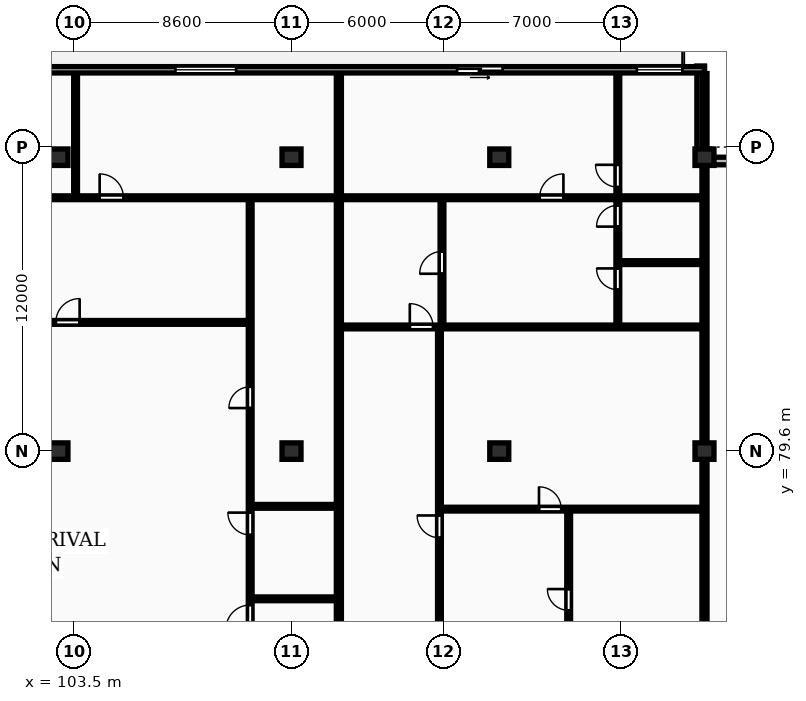
"""IFC4 building model, lengths in metres.
Left out: names, types, materials, properties, quantities, classifications, styles, units other than length and angle.
Written with IfcOpenShell. Run it as: python <this file> out.ifc"""

import sys

from ifc_helpers import new_model, si_unit, direction, frame, frame_2d, origin, origin_2d, place, context, subcontext, project, spatial, rectangle, extrude, element, fill, save


model = new_model("IFC4")
c1 = context("Model", 3, precision=1e-05, world=origin(), true_north=direction((0.0, 1.0)))
c2 = subcontext(c1, "Body", "Model", "MODEL_VIEW")
j1 = project(units=[si_unit("LENGTHUNIT", "METRE"), si_unit("PLANEANGLEUNIT", "RADIAN")], contexts=[c1])
p1 = place(None, origin())
s1 = spatial("IfcSite", under=j1, at=p1, CompositionType="ELEMENT")
p2 = place(p1, origin())
s2 = spatial("IfcBuilding", under=s1, at=p2, CompositionType="ELEMENT")
p3 = place(p2, frame((0.0, 0.0, 242.45)))
s3 = spatial("IfcBuildingStorey", under=s2, at=p3, CompositionType="ELEMENT", Elevation=242.45)
for number, where, z_axis, x_axis in (
    (1, (102.9, 79.6, 0.0), (0.0, 0.0, 1.0), (1.0, 0.0, 0.0)),
    (2, (102.9, 91.2, 0.0), (0.0, 0.0, 1.0), (1.0, 0.0, 0.0)),
    (3, (112.1, 79.6, 0.0), (0.0, 0.0, 1.0), (1.0, 0.0, 0.0)),
    (4, (112.1, 91.2, 0.0), (0.0, 0.0, 1.0), (1.0, 0.0, 0.0)),
    (5, (120.3, 79.6, 0.0), (0.0, 0.0, 1.0), (1.0, 0.0, 0.0)),
    (6, (120.3, 91.2, 0.0), (0.0, 0.0, 1.0), (1.0, 0.0, 0.0)),
    (7, (128.4, 79.6, 0.0), (0.0, 0.0, 1.0), (1.0, 0.0, 0.0)),
    (8, (128.4, 91.2, 0.0), (0.0, 0.0, 1.0), (1.0, 0.0, 0.0)),
):
    element("IfcColumn", number, at=place(p3, frame(where, z_axis=z_axis, x_axis=x_axis)), inside=s3, PredefinedType="COLUMN", context=c2, shape_type="SweptSolid", body=[
        extrude(rectangle(XDim=0.75, YDim=0.65, at=origin_2d()), origin(), (0.0, 0.0, 1.0), 3.45),
    ])
for number, where, z_axis, x_axis in (
    (9, (132.0, 91.05, 0.0), (0.0, 0.0, 1.0), (-1.0, 0.0, 0.0)),
    (10, (128.25, 91.2, 0.0), (0.0, 0.0, 1.0), (0.0, 1.0, 0.0)),
):
    element("IfcWall", number, at=place(p3, frame(where, z_axis=z_axis, x_axis=x_axis)), inside=s3, PredefinedType="STANDARD", context=c2, shape_type="SweptSolid", body=[
        extrude(rectangle(XDim=3.6, YDim=0.3, at=frame_2d((1.8, 0.0))), origin(), (0.0, 0.0, 1.0), 3.17),
    ])
p4 = place(p3, frame((128.4, 94.65, 0.0), z_axis=(0.0, 0.0, 1.0), x_axis=(-1.0, 0.0, 0.0)))
e11 = element("IfcWall", 11, at=p4, inside=s3, PredefinedType="STANDARD", context=c2, shape_type="SweptSolid", body=[
    extrude(rectangle(XDim=68.6, YDim=0.25, at=frame_2d((34.3, 0.0))), origin(), (0.0, 0.0, 1.0), 3.17),
])
p5 = place(p4, frame((59.137, 0.0, 0.85)))
e12 = element("IfcOpeningElement", 12, at=p5, cuts=e11, PredefinedType="OPENING", context=c2, shape_type="SweptSolid", body=[
    extrude(rectangle(XDim=2.4, YDim=1.9, at=frame_2d((1.2, 0.95))), frame((0.0, 0.135, 0.0), z_axis=(0.0, -1.0, 0.0), x_axis=(1.0, 0.0, 0.0)), (0.0, 0.0, 1.0), 0.27),
])
p6 = place(p4, frame((65.245, 0.0, 0.0)))
e13 = element("IfcOpeningElement", 13, at=p6, cuts=e11, PredefinedType="OPENING", context=c2, shape_type="SweptSolid", body=[
    extrude(rectangle(XDim=1.8, YDim=2.2, at=frame_2d((0.9, 1.1))), frame((0.0, 0.135, 0.0), z_axis=(0.0, -1.0, 0.0), x_axis=(1.0, 0.0, 0.0)), (0.0, 0.0, 1.0), 0.27),
])
p7 = place(p4, frame((53.56, 0.0, 0.85)))
e14 = element("IfcOpeningElement", 14, at=p7, cuts=e11, PredefinedType="OPENING", context=c2, shape_type="SweptSolid", body=[
    extrude(rectangle(XDim=2.4, YDim=1.9, at=frame_2d((1.2, 0.95))), frame((0.0, 0.135, 0.0), z_axis=(0.0, -1.0, 0.0), x_axis=(1.0, 0.0, 0.0)), (0.0, 0.0, 1.0), 0.27),
])
p8 = place(p4, frame((47.188, 0.0, 0.0)))
e15 = element("IfcOpeningElement", 15, at=p8, cuts=e11, PredefinedType="OPENING", context=c2, shape_type="SweptSolid", body=[
    extrude(rectangle(XDim=1.8, YDim=2.2, at=frame_2d((0.9, 1.1))), frame((0.0, 0.135, 0.0), z_axis=(0.0, -1.0, 0.0), x_axis=(1.0, 0.0, 0.0)), (0.0, 0.0, 1.0), 0.27),
])
p9 = place(p4, frame((36.928, 0.0, 0.85)))
e16 = element("IfcOpeningElement", 16, at=p9, cuts=e11, PredefinedType="OPENING", context=c2, shape_type="SweptSolid", body=[
    extrude(rectangle(XDim=2.4, YDim=1.9, at=frame_2d((1.2, 0.95))), frame((0.0, 0.135, 0.0), z_axis=(0.0, -1.0, 0.0), x_axis=(1.0, 0.0, 0.0)), (0.0, 0.0, 1.0), 0.27),
])
p10 = place(p4, frame((27.64, 0.0, 0.0)))
e17 = element("IfcOpeningElement", 17, at=p10, cuts=e11, PredefinedType="OPENING", context=c2, shape_type="SweptSolid", body=[
    extrude(rectangle(XDim=1.8, YDim=2.2, at=frame_2d((0.9, 1.1))), frame((0.0, 0.135, 0.0), z_axis=(0.0, -1.0, 0.0), x_axis=(1.0, 0.0, 0.0)), (0.0, 0.0, 1.0), 0.27),
])
p11 = place(p4, frame((18.487, 0.0, 0.85)))
e18 = element("IfcOpeningElement", 18, at=p11, cuts=e11, PredefinedType="OPENING", context=c2, shape_type="SweptSolid", body=[
    extrude(rectangle(XDim=2.4, YDim=1.9, at=frame_2d((1.2, 0.95))), frame((0.0, 0.135, 0.0), z_axis=(0.0, -1.0, 0.0), x_axis=(1.0, 0.0, 0.0)), (0.0, 0.0, 1.0), 0.27),
])
p12 = place(p4, frame((7.966, 0.0, 0.0)))
e19 = element("IfcOpeningElement", 19, at=p12, cuts=e11, PredefinedType="OPENING", context=c2, shape_type="SweptSolid", body=[
    extrude(rectangle(XDim=1.8, YDim=2.2, at=frame_2d((0.9, 1.1))), frame((0.0, 0.135, 0.0), z_axis=(0.0, -1.0, 0.0), x_axis=(1.0, 0.0, 0.0)), (0.0, 0.0, 1.0), 0.27),
])
p13 = place(p4, frame((0.87, 0.0, 0.85)))
e20 = element("IfcOpeningElement", 20, at=p13, cuts=e11, PredefinedType="OPENING", context=c2, shape_type="SweptSolid", body=[
    extrude(rectangle(XDim=1.8, YDim=1.8, at=frame_2d((0.9, 0.9))), frame((0.0, 0.135, 0.0), z_axis=(0.0, -1.0, 0.0), x_axis=(1.0, 0.0, 0.0)), (0.0, 0.0, 1.0), 0.27),
])
p14 = place(p3, frame((128.4, 70.18, 0.0), z_axis=(0.0, 0.0, 1.0), x_axis=(0.0, 1.0, 0.0)))
e21 = element("IfcWall", 21, at=p14, inside=s3, PredefinedType="PARTITIONING", context=c2, shape_type="SweptSolid", body=[
    extrude(rectangle(XDim=24.32, YDim=0.2, at=frame_2d((12.16, 0.0))), origin(), (0.0, 0.0, 1.0), 2.477),
])
p15 = place(p3, frame((113.969, 70.18, 0.0), z_axis=(0.0, 0.0, 1.0), x_axis=(0.0, 1.0, 0.0)))
e22 = element("IfcWall", 22, at=p15, inside=s3, PredefinedType="PARTITIONING", context=c2, shape_type="SweptSolid", body=[
    extrude(rectangle(XDim=24.32, YDim=0.2, at=frame_2d((12.16, 0.0))), origin(), (0.0, 0.0, 1.0), 3.17),
])
p16 = place(p3, frame((96.104, 84.68, 0.0), z_axis=(0.0, 0.0, 1.0), x_axis=(1.0, 0.0, 0.0)))
e23 = element("IfcWall", 23, at=p16, inside=s3, PredefinedType="PARTITIONING", context=c2, shape_type="SweptSolid", body=[
    extrude(rectangle(XDim=14.324, YDim=0.15, at=frame_2d((7.162, 0.0))), origin(), (0.0, 0.0, 1.0), 3.17),
])
p17 = place(p16, frame((6.692, 0.0, 0.0)))
e24 = element("IfcOpeningElement", 24, at=p17, cuts=e23, PredefinedType="OPENING", context=c2, shape_type="SweptSolid", body=[
    extrude(rectangle(XDim=0.94, YDim=2.1, at=frame_2d((0.47, 1.05))), frame((0.0, 0.085, 0.0), z_axis=(0.0, -1.0, 0.0), x_axis=(1.0, 0.0, 0.0)), (0.0, 0.0, 1.0), 0.17),
])
for number, where, z_axis, x_axis in (
    (25, (110.529, 73.77, 0.0), (0.0, 0.0, 1.0), (1.0, 0.0, 0.0)),
    (26, (110.529, 77.42, 0.0), (0.0, 0.0, 1.0), (1.0, 0.0, 0.0)),
):
    element("IfcWall", number, at=place(p3, frame(where, z_axis=z_axis, x_axis=x_axis)), inside=s3, PredefinedType="PARTITIONING", context=c2, shape_type="SweptSolid", body=[
        extrude(rectangle(XDim=3.36, YDim=0.15, at=frame_2d((1.68, 0.0))), origin(), (0.0, 0.0, 1.0), 3.17),
    ])
p18 = place(p3, frame((110.469, 70.16, 0.0), z_axis=(0.0, 0.0, 1.0), x_axis=(0.0, 1.0, 0.0)))
e27 = element("IfcWall", 27, at=p18, inside=s3, PredefinedType="PARTITIONING", context=c2, shape_type="SweptSolid", body=[
    extrude(rectangle(XDim=19.38, YDim=0.15, at=frame_2d((9.69, 0.0))), origin(), (0.0, 0.0, 1.0), 3.17),
])
p19 = place(p18, frame((2.406, 0.0, 0.0)))
e28 = element("IfcOpeningElement", 28, at=p19, cuts=e27, PredefinedType="OPENING", context=c2, shape_type="SweptSolid", body=[
    extrude(rectangle(XDim=0.96, YDim=2.1, at=frame_2d((0.48, 1.05))), frame((0.0, 0.085, 0.0), z_axis=(0.0, -1.0, 0.0), x_axis=(1.0, 0.0, 0.0)), (0.0, 0.0, 1.0), 0.17),
])
p20 = place(p18, frame((6.133, 0.0, 0.0)))
e29 = element("IfcOpeningElement", 29, at=p20, cuts=e27, PredefinedType="OPENING", context=c2, shape_type="SweptSolid", body=[
    extrude(rectangle(XDim=0.88, YDim=2.06, at=frame_2d((0.44, 1.03))), frame((0.0, 0.085, 0.0), z_axis=(0.0, -1.0, 0.0), x_axis=(1.0, 0.0, 0.0)), (0.0, 0.0, 1.0), 0.17),
])
p21 = place(p18, frame((11.139, 0.0, 0.0)))
e30 = element("IfcOpeningElement", 30, at=p21, cuts=e27, PredefinedType="OPENING", context=c2, shape_type="SweptSolid", body=[
    extrude(rectangle(XDim=0.84, YDim=2.04, at=frame_2d((0.42, 1.02))), frame((0.0, 0.085, 0.0), z_axis=(0.0, -1.0, 0.0), x_axis=(1.0, 0.0, 0.0)), (0.0, 0.0, 1.0), 0.17),
])
p22 = place(p3, frame((103.576, 89.68, 0.0), z_axis=(0.0, 0.0, 1.0), x_axis=(0.0, 1.0, 0.0)))
e31 = element("IfcWall", 31, at=p22, inside=s3, PredefinedType="PARTITIONING", context=c2, shape_type="SweptSolid", body=[
    extrude(rectangle(XDim=4.82, YDim=0.15, at=frame_2d((2.41, 0.0))), origin(), (0.0, 0.0, 1.0), 3.17),
])
p23 = place(p3, frame((96.104, 89.6, 0.0), z_axis=(0.0, 0.0, 1.0), x_axis=(1.0, 0.0, 0.0)))
e32 = element("IfcWall", 32, at=p23, inside=s3, PredefinedType="PARTITIONING", context=c2, shape_type="SweptSolid", body=[
    extrude(rectangle(XDim=17.785, YDim=0.15, at=frame_2d((8.892, 0.0))), origin(), (0.0, 0.0, 1.0), 3.17),
])
p24 = place(p23, frame((4.231, 0.0, 0.0)))
e33 = element("IfcOpeningElement", 33, at=p24, cuts=e32, PredefinedType="OPENING", context=c2, shape_type="SweptSolid", body=[
    extrude(rectangle(XDim=0.94, YDim=2.1, at=frame_2d((0.47, 1.05))), frame((0.0, 0.085, 0.0), z_axis=(0.0, -1.0, 0.0), x_axis=(1.0, 0.0, 0.0)), (0.0, 0.0, 1.0), 0.17),
])
p25 = place(p23, frame((8.422, 0.0, 0.0)))
e34 = element("IfcOpeningElement", 34, at=p25, cuts=e32, PredefinedType="OPENING", context=c2, shape_type="SweptSolid", body=[
    extrude(rectangle(XDim=0.94, YDim=2.1, at=frame_2d((0.47, 1.05))), frame((0.0, 0.085, 0.0), z_axis=(0.0, -1.0, 0.0), x_axis=(1.0, 0.0, 0.0)), (0.0, 0.0, 1.0), 0.17),
])
p26 = place(p3, frame((123.039, 70.16, 0.0), z_axis=(0.0, 0.0, 1.0), x_axis=(0.0, 1.0, 0.0)))
e35 = element("IfcWall", 35, at=p26, inside=s3, PredefinedType="PARTITIONING", context=c2, shape_type="SweptSolid", body=[
    extrude(rectangle(XDim=7.15, YDim=0.15, at=frame_2d((3.575, 0.0))), origin(), (0.0, 0.0, 1.0), 3.17),
])
p27 = place(p26, frame((3.155, 0.0, 0.0)))
e36 = element("IfcOpeningElement", 36, at=p27, cuts=e35, PredefinedType="OPENING", context=c2, shape_type="SweptSolid", body=[
    extrude(rectangle(XDim=0.84, YDim=2.04, at=frame_2d((0.42, 1.02))), frame((0.0, 0.085, 0.0), z_axis=(0.0, -1.0, 0.0), x_axis=(1.0, 0.0, 0.0)), (0.0, 0.0, 1.0), 0.17),
])
p28 = place(p3, frame((117.999, 77.31, 0.0), z_axis=(0.0, 0.0, 1.0), x_axis=(1.0, 0.0, 0.0)))
e37 = element("IfcWall", 37, at=p28, inside=s3, PredefinedType="PARTITIONING", context=c2, shape_type="SweptSolid", body=[
    extrude(rectangle(XDim=10.321, YDim=0.15, at=frame_2d((5.161, 0.0))), origin(), (0.0, 0.0, 1.0), 3.17),
])
p29 = place(p28, frame((3.869, 0.0, 0.0)))
e38 = element("IfcOpeningElement", 38, at=p29, cuts=e37, PredefinedType="OPENING", context=c2, shape_type="SweptSolid", body=[
    extrude(rectangle(XDim=0.88, YDim=2.06, at=frame_2d((0.44, 1.03))), frame((0.0, 0.085, 0.0), z_axis=(0.0, -1.0, 0.0), x_axis=(1.0, 0.0, 0.0)), (0.0, 0.0, 1.0), 0.17),
])
p30 = place(p3, frame((117.939, 70.16, 0.0), z_axis=(0.0, 0.0, 1.0), x_axis=(0.0, 1.0, 0.0)))
e39 = element("IfcWall", 39, at=p30, inside=s3, PredefinedType="PARTITIONING", context=c2, shape_type="SweptSolid", body=[
    extrude(rectangle(XDim=14.3, YDim=0.15, at=frame_2d((7.15, 0.0))), origin(), (0.0, 0.0, 1.0), 3.17),
])
p31 = place(p30, frame((6.02, 0.0, 0.0)))
e40 = element("IfcOpeningElement", 40, at=p31, cuts=e39, PredefinedType="OPENING", context=c2, shape_type="SweptSolid", body=[
    extrude(rectangle(XDim=0.88, YDim=2.06, at=frame_2d((0.44, 1.03))), frame((0.0, 0.085, 0.0), z_axis=(0.0, -1.0, 0.0), x_axis=(1.0, 0.0, 0.0)), (0.0, 0.0, 1.0), 0.17),
])
p32 = place(p3, frame((118.039, 84.54, 0.0), z_axis=(0.0, 0.0, 1.0), x_axis=(0.0, 1.0, 0.0)))
e41 = element("IfcWall", 41, at=p32, inside=s3, PredefinedType="PARTITIONING", context=c2, shape_type="SweptSolid", body=[
    extrude(rectangle(XDim=5.0, YDim=0.15, at=frame_2d((2.5, 0.0))), origin(), (0.0, 0.0, 1.0), 3.17),
])
p33 = place(p32, frame((2.06, 0.0, 0.0)))
e42 = element("IfcOpeningElement", 42, at=p33, cuts=e41, PredefinedType="OPENING", context=c2, shape_type="SweptSolid", body=[
    extrude(rectangle(XDim=0.88, YDim=2.06, at=frame_2d((0.44, 1.03))), frame((0.0, 0.085, 0.0), z_axis=(0.0, -1.0, 0.0), x_axis=(1.0, 0.0, 0.0)), (0.0, 0.0, 1.0), 0.17),
])
p34 = place(p3, frame((125.04, 87.04, 0.0), z_axis=(0.0, 0.0, 1.0), x_axis=(1.0, 0.0, 0.0)))
e43 = element("IfcWall", 43, at=p34, inside=s3, PredefinedType="PARTITIONING", context=c2, shape_type="SweptSolid", body=[
    extrude(rectangle(XDim=3.28, YDim=0.15, at=frame_2d((1.64, 0.0))), origin(), (0.0, 0.0, 1.0), 3.17),
])
p35 = place(p3, frame((124.98, 84.54, 0.0), z_axis=(0.0, 0.0, 1.0), x_axis=(0.0, 1.0, 0.0)))
e44 = element("IfcWall", 44, at=p35, inside=s3, PredefinedType="PARTITIONING", context=c2, shape_type="SweptSolid", body=[
    extrude(rectangle(XDim=9.96, YDim=0.15, at=frame_2d((4.98, 0.0))), origin(), (0.0, 0.0, 1.0), 3.17),
])
p36 = place(p35, frame((1.43, 0.0, 0.0)))
e45 = element("IfcOpeningElement", 45, at=p36, cuts=e44, PredefinedType="OPENING", context=c2, shape_type="SweptSolid", body=[
    extrude(rectangle(XDim=0.84, YDim=2.04, at=frame_2d((0.42, 1.02))), frame((0.0, 0.085, 0.0), z_axis=(0.0, -1.0, 0.0), x_axis=(1.0, 0.0, 0.0)), (0.0, 0.0, 1.0), 0.17),
])
p37 = place(p35, frame((3.92, 0.0, 0.0)))
e46 = element("IfcOpeningElement", 46, at=p37, cuts=e44, PredefinedType="OPENING", context=c2, shape_type="SweptSolid", body=[
    extrude(rectangle(XDim=0.84, YDim=2.04, at=frame_2d((0.42, 1.02))), frame((0.0, 0.085, 0.0), z_axis=(0.0, -1.0, 0.0), x_axis=(1.0, 0.0, 0.0)), (0.0, 0.0, 1.0), 0.17),
])
p38 = place(p35, frame((5.48, 0.0, 0.0)))
e47 = element("IfcOpeningElement", 47, at=p38, cuts=e44, PredefinedType="OPENING", context=c2, shape_type="SweptSolid", body=[
    extrude(rectangle(XDim=0.88, YDim=2.06, at=frame_2d((0.44, 1.03))), frame((0.0, 0.085, 0.0), z_axis=(0.0, -1.0, 0.0), x_axis=(1.0, 0.0, 0.0)), (0.0, 0.0, 1.0), 0.17),
])
p39 = place(p3, frame((114.049, 84.5, 0.0), z_axis=(0.0, 0.0, 1.0), x_axis=(1.0, 0.0, 0.0)))
e48 = element("IfcWall", 48, at=p39, inside=s3, PredefinedType="PARTITIONING", context=c2, shape_type="SweptSolid", body=[
    extrude(rectangle(XDim=14.271, YDim=0.15, at=frame_2d((7.136, 0.0))), origin(), (0.0, 0.0, 1.0), 3.17),
])
p40 = place(p39, frame((2.72, 0.0, 0.0)))
e49 = element("IfcOpeningElement", 49, at=p40, cuts=e48, PredefinedType="OPENING", context=c2, shape_type="SweptSolid", body=[
    extrude(rectangle(XDim=0.92, YDim=2.08, at=frame_2d((0.46, 1.04))), frame((0.0, 0.085, 0.0), z_axis=(0.0, -1.0, 0.0), x_axis=(1.0, 0.0, 0.0)), (0.0, 0.0, 1.0), 0.17),
])
p41 = place(p3, frame((114.049, 89.6, 0.0), z_axis=(0.0, 0.0, 1.0), x_axis=(1.0, 0.0, 0.0)))
e50 = element("IfcWall", 50, at=p41, inside=s3, PredefinedType="PARTITIONING", context=c2, shape_type="SweptSolid", body=[
    extrude(rectangle(XDim=14.271, YDim=0.15, at=frame_2d((7.136, 0.0))), origin(), (0.0, 0.0, 1.0), 3.17),
])
p42 = place(p41, frame((7.843, 0.0, 0.0)))
e51 = element("IfcOpeningElement", 51, at=p42, cuts=e50, PredefinedType="OPENING", context=c2, shape_type="SweptSolid", body=[
    extrude(rectangle(XDim=0.94, YDim=2.1, at=frame_2d((0.47, 1.05))), frame((0.0, 0.085, 0.0), z_axis=(0.0, -1.0, 0.0), x_axis=(1.0, 0.0, 0.0)), (0.0, 0.0, 1.0), 0.17),
])
p43 = place(p11, origin())
e52 = element("IfcWindow", 52, at=p43, inside=s3, PartitioningType="DOUBLE_PANEL_VERTICAL", PredefinedType="WINDOW", context=c2, shape_type="SweptSolid", body=[
    extrude(rectangle(XDim=2.4, YDim=1.9, at=frame_2d((1.2, 0.95))), frame((0.0, 0.03, 0.0), z_axis=(0.0, -1.0, 0.0), x_axis=(1.0, 0.0, 0.0)), (0.0, 0.0, 1.0), 0.06),
])
fill(e18, e52)
p44 = place(p12, origin())
e53 = element("IfcDoor", 53, at=p44, inside=s3, OperationType="SLIDING_TO_LEFT", PredefinedType="DOOR", context=c2, shape_type="SweptSolid", body=[
    extrude(rectangle(XDim=1.8, YDim=2.2, at=frame_2d((0.9, 1.1))), frame((0.0, 0.025, 0.0), z_axis=(0.0, -1.0, 0.0), x_axis=(1.0, 0.0, 0.0)), (0.0, 0.0, 1.0), 0.05),
])
fill(e19, e53)
p45 = place(p13, origin())
e54 = element("IfcWindow", 54, at=p45, inside=s3, PartitioningType="SINGLE_PANEL", PredefinedType="WINDOW", context=c2, shape_type="SweptSolid", body=[
    extrude(rectangle(XDim=1.8, YDim=1.8, at=frame_2d((0.9, 0.9))), frame((0.0, 0.03, 0.0), z_axis=(0.0, -1.0, 0.0), x_axis=(1.0, 0.0, 0.0)), (0.0, 0.0, 1.0), 0.06),
])
fill(e20, e54)
p46 = place(p17, origin())
e55 = element("IfcDoor", 55, at=p46, inside=s3, OperationType="SINGLE_SWING_RIGHT", PredefinedType="DOOR", context=c2, shape_type="SweptSolid", body=[
    extrude(rectangle(XDim=0.94, YDim=2.1, at=frame_2d((0.47, 1.05))), frame((0.0, 0.025, 0.0), z_axis=(0.0, -1.0, 0.0), x_axis=(1.0, 0.0, 0.0)), (0.0, 0.0, 1.0), 0.05),
])
fill(e24, e55)
p47 = place(p19, origin())
e56 = element("IfcDoor", 56, at=p47, inside=s3, OperationType="SINGLE_SWING_LEFT", PredefinedType="DOOR", context=c2, shape_type="SweptSolid", body=[
    extrude(rectangle(XDim=0.96, YDim=2.1, at=frame_2d((0.48, 1.05))), frame((0.0, 0.025, 0.0), z_axis=(0.0, -1.0, 0.0), x_axis=(1.0, 0.0, 0.0)), (0.0, 0.0, 1.0), 0.05),
])
fill(e28, e56)
p48 = place(p20, origin())
e57 = element("IfcDoor", 57, at=p48, inside=s3, OperationType="SINGLE_SWING_RIGHT", PredefinedType="DOOR", context=c2, shape_type="SweptSolid", body=[
    extrude(rectangle(XDim=0.88, YDim=2.06, at=frame_2d((0.44, 1.03))), frame((0.0, 0.025, 0.0), z_axis=(0.0, -1.0, 0.0), x_axis=(1.0, 0.0, 0.0)), (0.0, 0.0, 1.0), 0.05),
])
fill(e29, e57)
p49 = place(p21, origin())
e58 = element("IfcDoor", 58, at=p49, inside=s3, OperationType="SINGLE_SWING_LEFT", PredefinedType="DOOR", context=c2, shape_type="SweptSolid", body=[
    extrude(rectangle(XDim=0.84, YDim=2.04, at=frame_2d((0.42, 1.02))), frame((0.0, 0.025, 0.0), z_axis=(0.0, -1.0, 0.0), x_axis=(1.0, 0.0, 0.0)), (0.0, 0.0, 1.0), 0.05),
])
fill(e30, e58)
p50 = place(p25, origin())
e59 = element("IfcDoor", 59, at=p50, inside=s3, OperationType="SINGLE_SWING_LEFT", PredefinedType="DOOR", context=c2, shape_type="SweptSolid", body=[
    extrude(rectangle(XDim=0.94, YDim=2.1, at=frame_2d((0.47, 1.05))), frame((0.0, 0.025, 0.0), z_axis=(0.0, -1.0, 0.0), x_axis=(1.0, 0.0, 0.0)), (0.0, 0.0, 1.0), 0.05),
])
fill(e34, e59)
p51 = place(p27, origin())
e60 = element("IfcDoor", 60, at=p51, inside=s3, OperationType="SINGLE_SWING_RIGHT", PredefinedType="DOOR", context=c2, shape_type="SweptSolid", body=[
    extrude(rectangle(XDim=0.84, YDim=2.04, at=frame_2d((0.42, 1.02))), frame((0.0, 0.025, 0.0), z_axis=(0.0, -1.0, 0.0), x_axis=(1.0, 0.0, 0.0)), (0.0, 0.0, 1.0), 0.05),
])
fill(e36, e60)
p52 = place(p29, origin())
e61 = element("IfcDoor", 61, at=p52, inside=s3, OperationType="SINGLE_SWING_LEFT", PredefinedType="DOOR", context=c2, shape_type="SweptSolid", body=[
    extrude(rectangle(XDim=0.88, YDim=2.06, at=frame_2d((0.44, 1.03))), frame((0.0, 0.025, 0.0), z_axis=(0.0, -1.0, 0.0), x_axis=(1.0, 0.0, 0.0)), (0.0, 0.0, 1.0), 0.05),
])
fill(e38, e61)
p53 = place(p31, origin())
e62 = element("IfcDoor", 62, at=p53, inside=s3, OperationType="SINGLE_SWING_RIGHT", PredefinedType="DOOR", context=c2, shape_type="SweptSolid", body=[
    extrude(rectangle(XDim=0.88, YDim=2.06, at=frame_2d((0.44, 1.03))), frame((0.0, 0.025, 0.0), z_axis=(0.0, -1.0, 0.0), x_axis=(1.0, 0.0, 0.0)), (0.0, 0.0, 1.0), 0.05),
])
fill(e40, e62)
p54 = place(p33, origin())
e63 = element("IfcDoor", 63, at=p54, inside=s3, OperationType="SINGLE_SWING_LEFT", PredefinedType="DOOR", context=c2, shape_type="SweptSolid", body=[
    extrude(rectangle(XDim=0.88, YDim=2.06, at=frame_2d((0.44, 1.03))), frame((0.0, 0.025, 0.0), z_axis=(0.0, -1.0, 0.0), x_axis=(1.0, 0.0, 0.0)), (0.0, 0.0, 1.0), 0.05),
])
fill(e42, e63)
p55 = place(p36, origin())
e64 = element("IfcDoor", 64, at=p55, inside=s3, OperationType="SINGLE_SWING_RIGHT", PredefinedType="DOOR", context=c2, shape_type="SweptSolid", body=[
    extrude(rectangle(XDim=0.84, YDim=2.04, at=frame_2d((0.42, 1.02))), frame((0.0, 0.025, 0.0), z_axis=(0.0, -1.0, 0.0), x_axis=(1.0, 0.0, 0.0)), (0.0, 0.0, 1.0), 0.05),
])
fill(e45, e64)
p56 = place(p37, origin())
e65 = element("IfcDoor", 65, at=p56, inside=s3, OperationType="SINGLE_SWING_LEFT", PredefinedType="DOOR", context=c2, shape_type="SweptSolid", body=[
    extrude(rectangle(XDim=0.84, YDim=2.04, at=frame_2d((0.42, 1.02))), frame((0.0, 0.025, 0.0), z_axis=(0.0, -1.0, 0.0), x_axis=(1.0, 0.0, 0.0)), (0.0, 0.0, 1.0), 0.05),
])
fill(e46, e65)
p57 = place(p38, origin())
e66 = element("IfcDoor", 66, at=p57, inside=s3, OperationType="SINGLE_SWING_RIGHT", PredefinedType="DOOR", context=c2, shape_type="SweptSolid", body=[
    extrude(rectangle(XDim=0.88, YDim=2.06, at=frame_2d((0.44, 1.03))), frame((0.0, 0.025, 0.0), z_axis=(0.0, -1.0, 0.0), x_axis=(1.0, 0.0, 0.0)), (0.0, 0.0, 1.0), 0.05),
])
fill(e47, e66)
p58 = place(p40, origin())
e67 = element("IfcDoor", 67, at=p58, inside=s3, OperationType="SINGLE_SWING_LEFT", PredefinedType="DOOR", context=c2, shape_type="SweptSolid", body=[
    extrude(rectangle(XDim=0.92, YDim=2.08, at=frame_2d((0.46, 1.04))), frame((0.0, 0.025, 0.0), z_axis=(0.0, -1.0, 0.0), x_axis=(1.0, 0.0, 0.0)), (0.0, 0.0, 1.0), 0.05),
])
fill(e49, e67)
p59 = place(p42, origin())
e68 = element("IfcDoor", 68, at=p59, inside=s3, OperationType="SINGLE_SWING_RIGHT", PredefinedType="DOOR", context=c2, shape_type="SweptSolid", body=[
    extrude(rectangle(XDim=0.94, YDim=2.1, at=frame_2d((0.47, 1.05))), frame((0.0, 0.025, 0.0), z_axis=(0.0, -1.0, 0.0), x_axis=(1.0, 0.0, 0.0)), (0.0, 0.0, 1.0), 0.05),
])
fill(e51, e68)
save(model, sys.argv[1])
